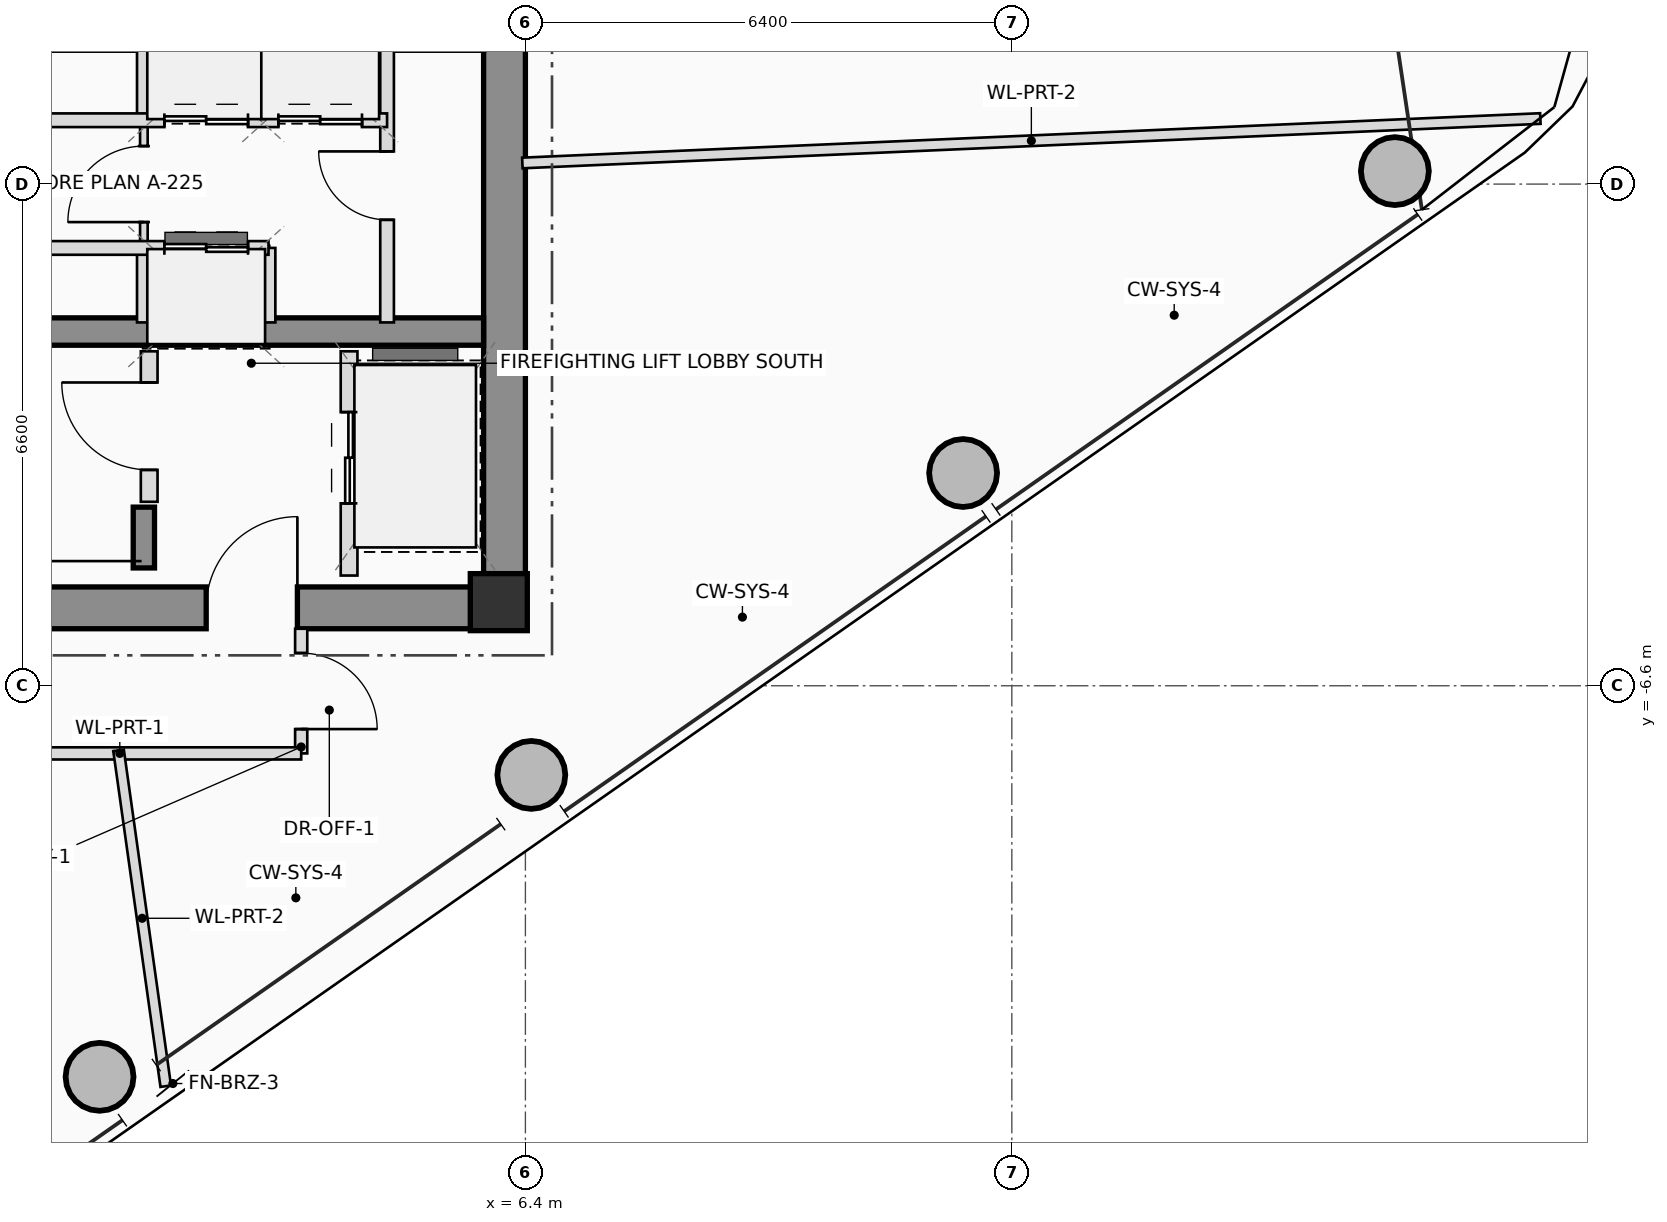
"""IFC4 building model, lengths in metres.
Left out: names, types, materials, properties, quantities, classifications, styles, units other than length and angle.
Written with IfcOpenShell. Run it as: python <this file> out.ifc"""

import sys

from ifc_helpers import new_model, si_unit, direction, frame, frame_2d, origin, origin_2d, place, context, subcontext, project, spatial, rectangle, hollow_circle, extrude, source, transform, mapped, element, fill, save


model = new_model("IFC4")
c1 = context("Model", 3, precision=1e-05, world=origin(), true_north=direction((0.0, 1.0)))
c2 = subcontext(c1, "Body", "Model", "MODEL_VIEW")
j1 = project(units=[si_unit("LENGTHUNIT", "METRE"), si_unit("PLANEANGLEUNIT", "RADIAN")], contexts=[c1])
p1 = place(None, origin())
s1 = spatial("IfcSite", under=j1, at=p1, CompositionType="ELEMENT")
p2 = place(p1, origin())
s2 = spatial("IfcBuilding", under=s1, at=p2, CompositionType="ELEMENT")
p3 = place(p2, frame((0.0, 0.0, 277.95)))
s3 = spatial("IfcBuildingStorey", under=s2, at=p3, CompositionType="ELEMENT", Elevation=277.95)
m1 = source(origin(), c2, "Body", "SweptSolid", [
    extrude(rectangle(XDim=0.75, YDim=0.75, at=origin_2d()), origin(), (0.0, 0.0, 1.0), 3.4),
])
p4 = place(p3, frame((6.05, -5.5, 0.0), z_axis=(0.0, 0.0, 1.0), x_axis=(1.0, 0.0, 0.0)))
e1 = element("IfcColumn", 1, at=p4, inside=s3, PredefinedType="COLUMN", context=c2, shape_type="MappedRepresentation", body=[
    mapped(m1, transform((0.0, 0.0, 0.0), scale=1.0)),
])
p5 = place(p3, frame((-6.4, -5.575, 0.0), z_axis=(0.0, 0.0, 1.0), x_axis=(1.0, 0.0, 0.0)))
e2 = element("IfcWall", 2, at=p5, inside=s3, PredefinedType="SHEAR", context=c2, shape_type="SweptSolid", body=[
    extrude(rectangle(XDim=12.8, YDim=0.55, at=frame_2d((6.4, 0.0))), origin(), (0.0, 0.0, 1.0), 3.4),
])
p6 = place(p5, frame((8.6, 0.0, 0.0)))
e3 = element("IfcOpeningElement", 3, at=p6, cuts=e2, PredefinedType="OPENING", context=c2, shape_type="SweptSolid", body=[
    extrude(rectangle(XDim=1.2, YDim=2.2, at=frame_2d((0.6, 1.1))), frame((0.0, 0.285, 0.0), z_axis=(0.0, -1.0, 0.0), x_axis=(1.0, 0.0, 0.0)), (0.0, 0.0, 1.0), 0.57),
])
p7 = place(p3, frame((6.125, -5.3, 0.0), z_axis=(0.0, 0.0, 1.0), x_axis=(0.0, 1.0, 0.0)))
e4 = element("IfcWall", 4, at=p7, inside=s3, PredefinedType="SHEAR", context=c2, shape_type="SweptSolid", body=[
    extrude(rectangle(XDim=10.6, YDim=0.55, at=frame_2d((5.3, 0.0))), origin(), (0.0, 0.0, 1.0), 3.4),
])
p8 = place(p3, frame((-5.85, -1.94, 0.0), z_axis=(0.0, 0.0, 1.0), x_axis=(1.0, 0.0, 0.0)))
e5 = element("IfcWall", 5, at=p8, inside=s3, PredefinedType="SHEAR", context=c2, shape_type="SweptSolid", body=[
    extrude(rectangle(XDim=11.7, YDim=0.36, at=frame_2d((5.85, 0.0))), origin(), (0.0, 0.0, 1.0), 3.4),
])
p9 = place(p3, frame((1.38, -5.05, 0.0), z_axis=(0.0, 0.0, 1.0), x_axis=(0.0, 1.0, 0.0)))
e6 = element("IfcWall", 6, at=p9, inside=s3, PredefinedType="SHEAR", context=c2, shape_type="SweptSolid", body=[
    extrude(rectangle(XDim=0.8, YDim=0.28, at=frame_2d((0.4, 0.0))), origin(), (0.0, 0.0, 1.0), 3.4),
])
m2 = source(origin(), c2, "Body", "SweptSolid", [
    extrude(hollow_circle(Radius=0.45, WallThickness=0.032, at=origin_2d()), origin(), (0.0, 0.0, 1.0), 3.4),
])
for number, where, z_axis, x_axis in (
    (7, (0.797, -11.745, 0.0), (0.0, 0.0, 1.0), (1.0, 0.0, 0.0)),
    (8, (6.478, -7.773, 0.0), (0.0, 0.0, 1.0), (1.0, 0.0, 0.0)),
    (9, (12.159, -3.801, 0.0), (0.0, 0.0, 1.0), (1.0, 0.0, 0.0)),
    (10, (17.84, 0.171, 0.0), (0.0, 0.0, 1.0), (1.0, 0.0, 0.0)),
):
    element("IfcColumn", number, at=place(p3, frame(where, z_axis=z_axis, x_axis=x_axis)), inside=s3, PredefinedType="COLUMN", context=c2, shape_type="MappedRepresentation", body=[
        mapped(m2, transform((0.0, 0.0, 0.0), scale=1.0)),
    ])
p10 = place(p3, frame((1.45, -4.18, 0.0), z_axis=(0.0, 0.0, 1.0), x_axis=(0.0, 1.0, 0.0)))
e11 = element("IfcWall", 11, at=p10, inside=s3, PredefinedType="PLUMBINGWALL", context=c2, shape_type="SweptSolid", body=[
    extrude(rectangle(XDim=1.98, YDim=0.22, at=frame_2d((0.99, 0.0))), origin(), (0.0, 0.0, 1.0), 3.2),
])
p11 = place(p10, frame((0.42, 0.0, 0.0)))
e12 = element("IfcOpeningElement", 12, at=p11, cuts=e11, PredefinedType="OPENING", context=c2, shape_type="SweptSolid", body=[
    extrude(rectangle(XDim=1.15, YDim=2.15, at=frame_2d((0.575, 1.075))), frame((0.0, 0.12, 0.0), z_axis=(0.0, -1.0, 0.0), x_axis=(1.0, 0.0, 0.0)), (0.0, 0.0, 1.0), 0.24),
])
p12 = place(p3, frame((4.08, -5.15, 0.0), z_axis=(0.0, 0.0, 1.0), x_axis=(0.0, 1.0, 0.0)))
e13 = element("IfcWall", 13, at=p12, inside=s3, PredefinedType="PLUMBINGWALL", context=c2, shape_type="SweptSolid", body=[
    extrude(rectangle(XDim=2.95, YDim=0.22, at=frame_2d((1.475, 0.0))), origin(), (0.0, 0.0, 1.0), 3.2),
])
p13 = place(p12, frame((0.95, 0.0, 0.0)))
e14 = element("IfcOpeningElement", 14, at=p13, cuts=e13, PredefinedType="OPENING", context=c2, shape_type="SweptSolid", body=[
    extrude(rectangle(XDim=1.2, YDim=2.25, at=frame_2d((0.6, 1.125))), frame((0.0, 0.12, 0.0), z_axis=(0.0, -1.0, 0.0), x_axis=(1.0, 0.0, 0.0)), (0.0, 0.0, 1.0), 0.24),
])
p14 = place(p3, frame((1.38, -0.84, 0.0), z_axis=(0.0, 0.0, 1.0), x_axis=(0.0, 1.0, 0.0)))
e15 = element("IfcWall", 15, at=p14, inside=s3, PredefinedType="PARTITIONING", context=c2, shape_type="SweptSolid", body=[
    extrude(rectangle(XDim=1.68, YDim=0.1, at=frame_2d((0.84, 0.0))), origin(), (0.0, 0.0, 1.0), 3.2),
])
p15 = place(p14, frame((0.34, 0.0, 0.0)))
e16 = element("IfcOpeningElement", 16, at=p15, cuts=e15, PredefinedType="OPENING", context=c2, shape_type="SweptSolid", body=[
    extrude(rectangle(XDim=1.0, YDim=2.25, at=frame_2d((0.5, 1.125))), frame((0.0, 0.06, 0.0), z_axis=(0.0, -1.0, 0.0), x_axis=(1.0, 0.0, 0.0)), (0.0, 0.0, 1.0), 0.12),
])
for number, where, z_axis, x_axis in (
    (17, (1.38, 0.84, 0.0), (0.0, 0.0, 1.0), (0.0, 1.0, 0.0)),
    (18, (1.38, -1.82, 0.0), (0.0, 0.0, 1.0), (0.0, 1.0, 0.0)),
    (19, (3.02, 0.84, 0.0), (0.0, 0.0, 1.0), (0.0, 1.0, 0.0)),
    (20, (4.38, 0.84, 0.0), (0.0, 0.0, 1.0), (0.0, 1.0, 0.0)),
    (21, (3.02, -1.82, 0.0), (0.0, 0.0, 1.0), (0.0, 1.0, 0.0)),
):
    element("IfcWall", number, at=place(p3, frame(where, z_axis=z_axis, x_axis=x_axis)), inside=s3, PredefinedType="PLUMBINGWALL", context=c2, shape_type="SweptSolid", body=[
        extrude(rectangle(XDim=0.98, YDim=0.18, at=frame_2d((0.49, 0.0))), origin(), (0.0, 0.0, 1.0), 3.2),
    ])
p16 = place(p3, frame((4.58, -1.82, 0.0), z_axis=(0.0, 0.0, 1.0), x_axis=(0.0, 1.0, 0.0)))
e22 = element("IfcWall", 22, at=p16, inside=s3, PredefinedType="PLUMBINGWALL", context=c2, shape_type="SweptSolid", body=[
    extrude(rectangle(XDim=3.64, YDim=0.18, at=frame_2d((1.82, 0.0))), origin(), (0.0, 0.0, 1.0), 3.2),
])
p17 = place(p16, frame((1.35, 0.0, 0.0)))
e23 = element("IfcOpeningElement", 23, at=p17, cuts=e22, PredefinedType="OPENING", context=c2, shape_type="SweptSolid", body=[
    extrude(rectangle(XDim=0.9, YDim=2.05, at=frame_2d((0.45, 1.025))), frame((0.0, 0.1, 0.0), z_axis=(0.0, -1.0, 0.0), x_axis=(1.0, 0.0, 0.0)), (0.0, 0.0, 1.0), 0.2),
])
p18 = place(p3, frame((-5.68, 0.84, 0.0), z_axis=(0.0, 0.0, 1.0), x_axis=(1.0, 0.0, 0.0)))
e24 = element("IfcWall", 24, at=p18, inside=s3, PredefinedType="PLUMBINGWALL", context=c2, shape_type="SweptSolid", body=[
    extrude(rectangle(XDim=10.26, YDim=0.18, at=frame_2d((5.13, 0.0))), origin(), (0.0, 0.0, 1.0), 3.2),
])
p19 = place(p18, frame((0.91, 0.0, 0.0)))
e25 = element("IfcOpeningElement", 25, at=p19, cuts=e24, PredefinedType="OPENING", context=c2, shape_type="SweptSolid", body=[
    extrude(rectangle(XDim=0.9, YDim=2.05, at=frame_2d((0.45, 1.025))), frame((0.0, 0.1, 0.0), z_axis=(0.0, -1.0, 0.0), x_axis=(1.0, 0.0, 0.0)), (0.0, 0.0, 1.0), 0.2),
])
p20 = place(p18, frame((4.38, 0.0, 0.0)))
e26 = element("IfcOpeningElement", 26, at=p20, cuts=e24, PredefinedType="OPENING", context=c2, shape_type="SweptSolid", body=[
    extrude(rectangle(XDim=0.9, YDim=2.05, at=frame_2d((0.45, 1.025))), frame((0.0, 0.1, 0.0), z_axis=(0.0, -1.0, 0.0), x_axis=(1.0, 0.0, 0.0)), (0.0, 0.0, 1.0), 0.2),
])
p21 = place(p18, frame((7.33, 0.0, 0.0)))
e27 = element("IfcOpeningElement", 27, at=p21, cuts=e24, PredefinedType="OPENING", context=c2, shape_type="SweptSolid", body=[
    extrude(rectangle(XDim=1.1, YDim=2.2, at=frame_2d((0.55, 1.1))), frame((0.0, 0.1, 0.0), z_axis=(0.0, -1.0, 0.0), x_axis=(1.0, 0.0, 0.0)), (0.0, 0.0, 1.0), 0.2),
])
p22 = place(p18, frame((8.83, 0.0, 0.0)))
e28 = element("IfcOpeningElement", 28, at=p22, cuts=e24, PredefinedType="OPENING", context=c2, shape_type="SweptSolid", body=[
    extrude(rectangle(XDim=1.1, YDim=2.2, at=frame_2d((0.55, 1.1))), frame((0.0, 0.1, 0.0), z_axis=(0.0, -1.0, 0.0), x_axis=(1.0, 0.0, 0.0)), (0.0, 0.0, 1.0), 0.2),
])
p23 = place(p3, frame((-5.68, -0.84, 0.0), z_axis=(0.0, 0.0, 1.0), x_axis=(1.0, 0.0, 0.0)))
e29 = element("IfcWall", 29, at=p23, inside=s3, PredefinedType="PLUMBINGWALL", context=c2, shape_type="SweptSolid", body=[
    extrude(rectangle(XDim=8.7, YDim=0.18, at=frame_2d((4.35, 0.0))), origin(), (0.0, 0.0, 1.0), 3.2),
])
p24 = place(p23, frame((3.13, 0.0, 0.0)))
e30 = element("IfcOpeningElement", 30, at=p24, cuts=e29, PredefinedType="OPENING", context=c2, shape_type="SweptSolid", body=[
    extrude(rectangle(XDim=0.9, YDim=2.05, at=frame_2d((0.45, 1.025))), frame((0.0, 0.1, 0.0), z_axis=(0.0, -1.0, 0.0), x_axis=(1.0, 0.0, 0.0)), (0.0, 0.0, 1.0), 0.2),
])
p25 = place(p23, frame((7.33, 0.0, 0.0)))
e31 = element("IfcOpeningElement", 31, at=p25, cuts=e29, PredefinedType="OPENING", context=c2, shape_type="SweptSolid", body=[
    extrude(rectangle(XDim=1.1, YDim=2.2, at=frame_2d((0.55, 1.1))), frame((0.0, 0.1, 0.0), z_axis=(0.0, -1.0, 0.0), x_axis=(1.0, 0.0, 0.0)), (0.0, 0.0, 1.0), 0.2),
])
p26 = place(p3, frame((3.45, -5.85, 0.0), z_axis=(0.0, 0.0, 1.0), x_axis=(0.0, -1.0, 0.0)))
e32 = element("IfcWall", 32, at=p26, inside=s3, PredefinedType="PARTITIONING", context=c2, shape_type="SweptSolid", body=[
    extrude(rectangle(XDim=1.64, YDim=0.16, at=frame_2d((0.82, 0.0))), origin(), (0.0, 0.0, 1.0), 3.2),
])
p27 = place(p26, frame((0.32, 0.0, 0.0)))
e33 = element("IfcOpeningElement", 33, at=p27, cuts=e32, PredefinedType="OPENING", context=c2, shape_type="SweptSolid", body=[
    extrude(rectangle(XDim=1.0, YDim=2.25, at=frame_2d((0.5, 1.125))), frame((0.0, 0.09, 0.0), z_axis=(0.0, -1.0, 0.0), x_axis=(1.0, 0.0, 0.0)), (0.0, 0.0, 1.0), 0.18),
])
p28 = place(p3, frame((3.45, -7.49, 0.0), z_axis=(0.0, 0.0, 1.0), x_axis=(-1.0, 0.0, 0.0)))
e34 = element("IfcWall", 34, at=p28, inside=s3, PredefinedType="PARTITIONING", context=c2, shape_type="SweptSolid", body=[
    extrude(rectangle(XDim=9.81, YDim=0.16, at=frame_2d((4.905, 0.0))), origin(), (0.0, 0.0, 1.0), 2.605),
])
p29 = place(p28, frame((4.923, 0.0, 0.0)))
e35 = element("IfcOpeningElement", 35, at=p29, cuts=e34, PredefinedType="OPENING", context=c2, shape_type="SweptSolid", body=[
    extrude(rectangle(XDim=1.0, YDim=2.25, at=frame_2d((0.5, 1.125))), frame((0.0, 0.09, 0.0), z_axis=(0.0, -1.0, 0.0), x_axis=(1.0, 0.0, 0.0)), (0.0, 0.0, 1.0), 0.18),
])
p30 = place(p3, frame((6.36, 0.278, 0.0), z_axis=(0.0, 0.0, 1.0), x_axis=(0.999047617824, 0.043633213494, 0.0)))
e36 = element("IfcWall", 36, at=p30, inside=s3, PredefinedType="PARTITIONING", context=c2, shape_type="SweptSolid", body=[
    extrude(rectangle(XDim=13.406, YDim=0.14, at=frame_2d((6.703, 0.0))), origin(), (0.0, 0.0, 1.0), 2.605),
])
p31 = place(p3, frame((1.047, -7.45, 0.0), z_axis=(0.0, 0.0, 1.0), x_axis=(0.139153381551, -0.990270839924, 0.0)))
e37 = element("IfcWall", 37, at=p31, inside=s3, PredefinedType="PARTITIONING", context=c2, shape_type="SweptSolid", body=[
    extrude(rectangle(XDim=4.462, YDim=0.14, at=frame_2d((2.231, 0.0))), origin(), (0.0, 0.0, 1.0), 2.605),
])
p32 = place(p6, origin())
e38 = element("IfcDoor", 38, at=p32, inside=s3, OperationType="SINGLE_SWING_RIGHT", PredefinedType="DOOR", context=c2, shape_type="SweptSolid", body=[
    extrude(rectangle(XDim=1.2, YDim=2.2, at=frame_2d((0.6, 1.1))), frame((0.0, 0.025, 0.0), z_axis=(0.0, -1.0, 0.0), x_axis=(1.0, 0.0, 0.0)), (0.0, 0.0, 1.0), 0.05),
])
fill(e3, e38)
p33 = place(p11, origin())
e39 = element("IfcDoor", 39, at=p33, inside=s3, OperationType="SINGLE_SWING_RIGHT", PredefinedType="DOOR", context=c2, shape_type="SweptSolid", body=[
    extrude(rectangle(XDim=1.15, YDim=2.15, at=frame_2d((0.575, 1.075))), frame((0.0, 0.025, 0.0), z_axis=(0.0, -1.0, 0.0), x_axis=(1.0, 0.0, 0.0)), (0.0, 0.0, 1.0), 0.05),
])
fill(e12, e39)
p34 = place(p13, origin())
e40 = element("IfcDoor", 40, at=p34, inside=s3, OperationType="DOUBLE_DOOR_SLIDING", PredefinedType="DOOR", context=c2, shape_type="SweptSolid", body=[
    extrude(rectangle(XDim=1.2, YDim=2.25, at=frame_2d((0.6, 1.125))), frame((0.0, 0.025, 0.0), z_axis=(0.0, -1.0, 0.0), x_axis=(1.0, 0.0, 0.0)), (0.0, 0.0, 1.0), 0.05),
])
fill(e14, e40)
p35 = place(p15, origin())
e41 = element("IfcDoor", 41, at=p35, inside=s3, OperationType="SINGLE_SWING_LEFT", PredefinedType="DOOR", context=c2, shape_type="SweptSolid", body=[
    extrude(rectangle(XDim=1.0, YDim=2.25, at=frame_2d((0.5, 1.125))), frame((0.0, 0.025, 0.0), z_axis=(0.0, -1.0, 0.0), x_axis=(1.0, 0.0, 0.0)), (0.0, 0.0, 1.0), 0.05),
])
fill(e16, e41)
p36 = place(p17, origin())
e42 = element("IfcDoor", 42, at=p36, inside=s3, OperationType="SINGLE_SWING_RIGHT", PredefinedType="DOOR", context=c2, shape_type="SweptSolid", body=[
    extrude(rectangle(XDim=0.9, YDim=2.05, at=frame_2d((0.45, 1.025))), frame((0.0, 0.025, 0.0), z_axis=(0.0, -1.0, 0.0), x_axis=(1.0, 0.0, 0.0)), (0.0, 0.0, 1.0), 0.05),
])
fill(e23, e42)
p37 = place(p21, origin())
e43 = element("IfcDoor", 43, at=p37, inside=s3, OperationType="DOUBLE_DOOR_SLIDING", PredefinedType="DOOR", context=c2, shape_type="SweptSolid", body=[
    extrude(rectangle(XDim=1.1, YDim=2.2, at=frame_2d((0.55, 1.1))), frame((0.0, 0.025, 0.0), z_axis=(0.0, -1.0, 0.0), x_axis=(1.0, 0.0, 0.0)), (0.0, 0.0, 1.0), 0.05),
])
fill(e27, e43)
p38 = place(p22, origin())
e44 = element("IfcDoor", 44, at=p38, inside=s3, OperationType="DOUBLE_DOOR_SLIDING", PredefinedType="DOOR", context=c2, shape_type="SweptSolid", body=[
    extrude(rectangle(XDim=1.1, YDim=2.2, at=frame_2d((0.55, 1.1))), frame((0.0, 0.025, 0.0), z_axis=(0.0, -1.0, 0.0), x_axis=(1.0, 0.0, 0.0)), (0.0, 0.0, 1.0), 0.05),
])
fill(e28, e44)
p39 = place(p25, origin())
e45 = element("IfcDoor", 45, at=p39, inside=s3, OperationType="DOUBLE_DOOR_SLIDING", PredefinedType="DOOR", context=c2, shape_type="SweptSolid", body=[
    extrude(rectangle(XDim=1.1, YDim=2.2, at=frame_2d((0.55, 1.1))), frame((0.0, 0.025, 0.0), z_axis=(0.0, -1.0, 0.0), x_axis=(1.0, 0.0, 0.0)), (0.0, 0.0, 1.0), 0.05),
])
fill(e31, e45)
p40 = place(p27, origin())
e46 = element("IfcDoor", 46, at=p40, inside=s3, OperationType="SINGLE_SWING_RIGHT", PredefinedType="DOOR", context=c2, shape_type="SweptSolid", body=[
    extrude(rectangle(XDim=1.0, YDim=2.25, at=frame_2d((0.5, 1.125))), frame((0.0, 0.025, 0.0), z_axis=(0.0, -1.0, 0.0), x_axis=(1.0, 0.0, 0.0)), (0.0, 0.0, 1.0), 0.05),
])
fill(e33, e46)
save(model, sys.argv[1])
